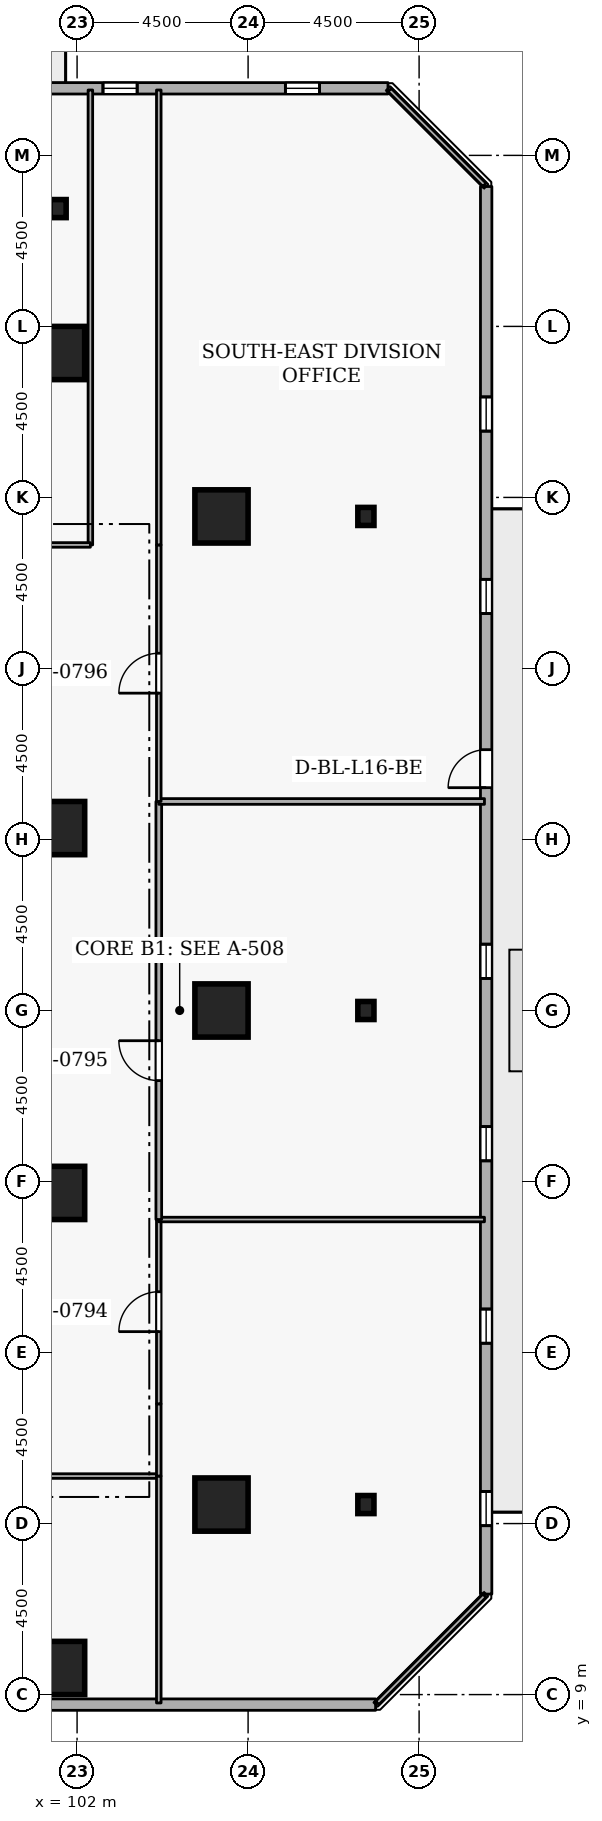
"""IFC4 building model, lengths in metres.
Left out: names, types, materials, properties, quantities, classifications, styles, units other than length and angle.
Written with IfcOpenShell. Run it as: python <this file> out.ifc"""

import sys

from ifc_helpers import new_model, si_unit, direction, frame, frame_2d, origin, origin_2d, place, context, subcontext, project, spatial, rectangle, i_section, extrude, element, fill, save


model = new_model("IFC4")
c1 = context("Model", 3, precision=1e-05, world=origin(), true_north=direction((0.0, 1.0)))
c2 = subcontext(c1, "Body", "Model", "MODEL_VIEW")
j1 = project(units=[si_unit("LENGTHUNIT", "METRE"), si_unit("PLANEANGLEUNIT", "RADIAN")], contexts=[c1])
p1 = place(None, origin())
s1 = spatial("IfcSite", under=j1, at=p1, CompositionType="ELEMENT")
p2 = place(p1, origin())
s2 = spatial("IfcBuilding", under=s1, at=p2, CompositionType="ELEMENT")
p3 = place(p2, frame((0.0, 0.0, 64.5)))
s3 = spatial("IfcBuildingStorey", under=s2, at=p3, CompositionType="ELEMENT", Elevation=64.5)
for number, where, z_axis, x_axis in (
    (1, (105.8, 14.0, 0.0), (0.0, 0.0, 1.0), (1.0, 0.0, 0.0)),
    (2, (105.8, 27.0, 0.0), (0.0, 0.0, 1.0), (1.0, 0.0, 0.0)),
    (3, (105.8, 40.0, 0.0), (0.0, 0.0, 1.0), (1.0, 0.0, 0.0)),
    (4, (101.5, 44.3, 0.0), (0.0, 0.0, 1.0), (1.0, 0.0, 0.0)),
    (5, (101.5, 9.7, 0.0), (0.0, 0.0, 1.0), (1.0, 0.0, 0.0)),
    (6, (101.5, 22.2, 0.0), (0.0, 0.0, 1.0), (1.0, 0.0, 0.0)),
    (7, (101.5, 31.8, 0.0), (0.0, 0.0, 1.0), (1.0, 0.0, 0.0)),
):
    element("IfcColumn", number, at=place(p3, frame(where, z_axis=z_axis, x_axis=x_axis)), inside=s3, PredefinedType="COLUMN", context=c2, shape_type="SweptSolid", body=[
        extrude(rectangle(XDim=1.4, YDim=1.4, at=origin_2d()), origin(), (0.0, 0.0, 1.0), 3.6),
    ])
for number, where, z_axis, x_axis in (
    (8, (109.6, 14.0, 0.0), (0.0, 0.0, 1.0), (1.0, 0.0, 0.0)),
    (9, (109.6, 27.0, 0.0), (0.0, 0.0, 1.0), (1.0, 0.0, 0.0)),
    (10, (109.6, 40.0, 0.0), (0.0, 0.0, 1.0), (1.0, 0.0, 0.0)),
    (11, (101.5, 48.1, 0.0), (0.0, 0.0, 1.0), (1.0, 0.0, 0.0)),
):
    element("IfcColumn", number, at=place(p3, frame(where, z_axis=z_axis, x_axis=x_axis)), inside=s3, PredefinedType="COLUMN", context=c2, shape_type="SweptSolid", body=[
        extrude(i_section(OverallWidth=0.424, OverallDepth=0.475, WebThickness=0.048, FlangeThickness=0.077, FilletRadius=0.015, at=origin_2d()), origin(), (0.0, 0.0, 1.0), 3.6),
    ])
p4 = place(p3, frame((72.819, 8.735, 0.0), z_axis=(0.0, 0.0, 1.0), x_axis=(0.999999999457, 3.2959355e-05, 0.0)))
e12 = element("IfcWall", 12, at=p4, inside=s3, PredefinedType="STANDARD", context=c2, shape_type="SweptSolid", body=[
    extrude(rectangle(XDim=37.037, YDim=0.3, at=frame_2d((18.518, 0.0))), origin(), (0.0, 0.0, 1.0), 2.7),
])
p5 = place(p4, frame((6.6, 0.0, 0.72)))
e13 = element("IfcOpeningElement", 13, at=p5, cuts=e12, PredefinedType="OPENING", context=c2, shape_type="SweptSolid", body=[
    extrude(rectangle(XDim=0.9, YDim=1.75, at=frame_2d((0.45, 0.875))), frame((0.0, 0.16, 0.0), z_axis=(0.0, -1.0, 0.0), x_axis=(1.0, 0.0, 0.0)), (0.0, 0.0, 1.0), 0.32),
])
p6 = place(p4, frame((11.4, 0.0, 0.72)))
e14 = element("IfcOpeningElement", 14, at=p6, cuts=e12, PredefinedType="OPENING", context=c2, shape_type="SweptSolid", body=[
    extrude(rectangle(XDim=0.9, YDim=1.75, at=frame_2d((0.45, 0.875))), frame((0.0, 0.16, 0.0), z_axis=(0.0, -1.0, 0.0), x_axis=(1.0, 0.0, 0.0)), (0.0, 0.0, 1.0), 0.32),
])
p7 = place(p4, frame((21.0, 0.0, 0.72)))
e15 = element("IfcOpeningElement", 15, at=p7, cuts=e12, PredefinedType="OPENING", context=c2, shape_type="SweptSolid", body=[
    extrude(rectangle(XDim=0.9, YDim=1.75, at=frame_2d((0.45, 0.875))), frame((0.0, 0.16, 0.0), z_axis=(0.0, -1.0, 0.0), x_axis=(1.0, 0.0, 0.0)), (0.0, 0.0, 1.0), 0.32),
])
p8 = place(p4, frame((25.8, 0.0, 0.72)))
e16 = element("IfcOpeningElement", 16, at=p8, cuts=e12, PredefinedType="OPENING", context=c2, shape_type="SweptSolid", body=[
    extrude(rectangle(XDim=0.9, YDim=1.75, at=frame_2d((0.45, 0.875))), frame((0.0, 0.16, 0.0), z_axis=(0.0, -1.0, 0.0), x_axis=(1.0, 0.0, 0.0)), (0.0, 0.0, 1.0), 0.32),
])
p9 = place(p3, frame((112.764, 11.645, 0.0), z_axis=(0.0, 0.0, 1.0), x_axis=(3.2959355e-05, 0.999999999457, 0.0)))
e17 = element("IfcWall", 17, at=p9, inside=s3, PredefinedType="STANDARD", context=c2, shape_type="SweptSolid", body=[
    extrude(rectangle(XDim=37.037, YDim=0.3, at=frame_2d((18.518, 0.0))), origin(), (0.0, 0.0, 1.0), 2.7),
])
p10 = place(p9, frame((21.218, 0.0, 0.0)))
e18 = element("IfcOpeningElement", 18, at=p10, cuts=e17, PredefinedType="OPENING", context=c2, shape_type="SweptSolid", body=[
    extrude(rectangle(XDim=1.0, YDim=2.08, at=frame_2d((0.5, 1.04))), frame((0.0, 0.16, 0.0), z_axis=(0.0, -1.0, 0.0), x_axis=(1.0, 0.0, 0.0)), (0.0, 0.0, 1.0), 0.32),
])
p11 = place(p9, frame((1.8, 0.0, 0.72)))
e19 = element("IfcOpeningElement", 19, at=p11, cuts=e17, PredefinedType="OPENING", context=c2, shape_type="SweptSolid", body=[
    extrude(rectangle(XDim=0.9, YDim=1.75, at=frame_2d((0.45, 0.875))), frame((0.0, 0.16, 0.0), z_axis=(0.0, -1.0, 0.0), x_axis=(1.0, 0.0, 0.0)), (0.0, 0.0, 1.0), 0.32),
])
p12 = place(p9, frame((6.6, 0.0, 0.72)))
e20 = element("IfcOpeningElement", 20, at=p12, cuts=e17, PredefinedType="OPENING", context=c2, shape_type="SweptSolid", body=[
    extrude(rectangle(XDim=0.9, YDim=1.75, at=frame_2d((0.45, 0.875))), frame((0.0, 0.16, 0.0), z_axis=(0.0, -1.0, 0.0), x_axis=(1.0, 0.0, 0.0)), (0.0, 0.0, 1.0), 0.32),
])
p13 = place(p9, frame((11.4, 0.0, 0.72)))
e21 = element("IfcOpeningElement", 21, at=p13, cuts=e17, PredefinedType="OPENING", context=c2, shape_type="SweptSolid", body=[
    extrude(rectangle(XDim=0.9, YDim=1.75, at=frame_2d((0.45, 0.875))), frame((0.0, 0.16, 0.0), z_axis=(0.0, -1.0, 0.0), x_axis=(1.0, 0.0, 0.0)), (0.0, 0.0, 1.0), 0.32),
])
p14 = place(p9, frame((16.2, 0.0, 0.72)))
e22 = element("IfcOpeningElement", 22, at=p14, cuts=e17, PredefinedType="OPENING", context=c2, shape_type="SweptSolid", body=[
    extrude(rectangle(XDim=0.9, YDim=1.75, at=frame_2d((0.45, 0.875))), frame((0.0, 0.16, 0.0), z_axis=(0.0, -1.0, 0.0), x_axis=(1.0, 0.0, 0.0)), (0.0, 0.0, 1.0), 0.32),
])
p15 = place(p9, frame((25.8, 0.0, 0.72)))
e23 = element("IfcOpeningElement", 23, at=p15, cuts=e17, PredefinedType="OPENING", context=c2, shape_type="SweptSolid", body=[
    extrude(rectangle(XDim=0.9, YDim=1.75, at=frame_2d((0.45, 0.875))), frame((0.0, 0.16, 0.0), z_axis=(0.0, -1.0, 0.0), x_axis=(1.0, 0.0, 0.0)), (0.0, 0.0, 1.0), 0.32),
])
p16 = place(p9, frame((30.6, 0.0, 0.72)))
e24 = element("IfcOpeningElement", 24, at=p16, cuts=e17, PredefinedType="OPENING", context=c2, shape_type="SweptSolid", body=[
    extrude(rectangle(XDim=0.9, YDim=1.75, at=frame_2d((0.45, 0.875))), frame((0.0, 0.16, 0.0), z_axis=(0.0, -1.0, 0.0), x_axis=(1.0, 0.0, 0.0)), (0.0, 0.0, 1.0), 0.32),
])
p17 = place(p3, frame((110.181, 51.265, 0.0), z_axis=(0.0, 0.0, 1.0), x_axis=(-0.999999999457, -3.2959355e-05, 0.0)))
e25 = element("IfcWall", 25, at=p17, inside=s3, PredefinedType="STANDARD", context=c2, shape_type="SweptSolid", body=[
    extrude(rectangle(XDim=37.037, YDim=0.3, at=frame_2d((18.518, 0.0))), origin(), (0.0, 0.0, 1.0), 2.7),
])
p18 = place(p17, frame((20.318, 0.0, 0.0)))
e26 = element("IfcOpeningElement", 26, at=p18, cuts=e25, PredefinedType="OPENING", context=c2, shape_type="SweptSolid", body=[
    extrude(rectangle(XDim=1.0, YDim=2.08, at=frame_2d((0.5, 1.04))), frame((0.0, 0.16, 0.0), z_axis=(0.0, -1.0, 0.0), x_axis=(1.0, 0.0, 0.0)), (0.0, 0.0, 1.0), 0.32),
])
p19 = place(p17, frame((1.8, 0.0, 0.72)))
e27 = element("IfcOpeningElement", 27, at=p19, cuts=e25, PredefinedType="OPENING", context=c2, shape_type="SweptSolid", body=[
    extrude(rectangle(XDim=0.9, YDim=1.75, at=frame_2d((0.45, 0.875))), frame((0.0, 0.16, 0.0), z_axis=(0.0, -1.0, 0.0), x_axis=(1.0, 0.0, 0.0)), (0.0, 0.0, 1.0), 0.32),
])
p20 = place(p17, frame((6.6, 0.0, 0.72)))
e28 = element("IfcOpeningElement", 28, at=p20, cuts=e25, PredefinedType="OPENING", context=c2, shape_type="SweptSolid", body=[
    extrude(rectangle(XDim=0.9, YDim=1.75, at=frame_2d((0.45, 0.875))), frame((0.0, 0.16, 0.0), z_axis=(0.0, -1.0, 0.0), x_axis=(1.0, 0.0, 0.0)), (0.0, 0.0, 1.0), 0.32),
])
p21 = place(p17, frame((11.4, 0.0, 0.72)))
e29 = element("IfcOpeningElement", 29, at=p21, cuts=e25, PredefinedType="OPENING", context=c2, shape_type="SweptSolid", body=[
    extrude(rectangle(XDim=0.9, YDim=1.75, at=frame_2d((0.45, 0.875))), frame((0.0, 0.16, 0.0), z_axis=(0.0, -1.0, 0.0), x_axis=(1.0, 0.0, 0.0)), (0.0, 0.0, 1.0), 0.32),
])
p22 = place(p17, frame((16.2, 0.0, 0.72)))
e30 = element("IfcOpeningElement", 30, at=p22, cuts=e25, PredefinedType="OPENING", context=c2, shape_type="SweptSolid", body=[
    extrude(rectangle(XDim=0.9, YDim=1.75, at=frame_2d((0.45, 0.875))), frame((0.0, 0.16, 0.0), z_axis=(0.0, -1.0, 0.0), x_axis=(1.0, 0.0, 0.0)), (0.0, 0.0, 1.0), 0.32),
])
p23 = place(p17, frame((25.8, 0.0, 0.72)))
e31 = element("IfcOpeningElement", 31, at=p23, cuts=e25, PredefinedType="OPENING", context=c2, shape_type="SweptSolid", body=[
    extrude(rectangle(XDim=0.9, YDim=1.75, at=frame_2d((0.45, 0.875))), frame((0.0, 0.16, 0.0), z_axis=(0.0, -1.0, 0.0), x_axis=(1.0, 0.0, 0.0)), (0.0, 0.0, 1.0), 0.32),
])
p24 = place(p17, frame((30.6, 0.0, 0.72)))
e32 = element("IfcOpeningElement", 32, at=p24, cuts=e25, PredefinedType="OPENING", context=c2, shape_type="SweptSolid", body=[
    extrude(rectangle(XDim=0.9, YDim=1.75, at=frame_2d((0.45, 0.875))), frame((0.0, 0.16, 0.0), z_axis=(0.0, -1.0, 0.0), x_axis=(1.0, 0.0, 0.0)), (0.0, 0.0, 1.0), 0.32),
])
p25 = place(p3, frame((94.8, 14.75, 0.0), z_axis=(0.0, 0.0, 1.0), x_axis=(1.0, 0.0, 0.0)))
e33 = element("IfcWall", 33, at=p25, inside=s3, PredefinedType="PARTITIONING", context=c2, shape_type="SweptSolid", body=[
    extrude(rectangle(XDim=9.35, YDim=0.12, at=frame_2d((4.675, 0.0))), origin(), (0.0, 0.0, 1.0), 3.34),
])
p26 = place(p25, frame((4.15, 0.0, 0.0)))
e34 = element("IfcOpeningElement", 34, at=p26, cuts=e33, PredefinedType="OPENING", context=c2, shape_type="SweptSolid", body=[
    extrude(rectangle(XDim=1.05, YDim=2.1, at=frame_2d((0.525, 1.05))), frame((0.0, 0.07, 0.0), z_axis=(0.0, -1.0, 0.0), x_axis=(1.0, 0.0, 0.0)), (0.0, 0.0, 1.0), 0.14),
])
p27 = place(p3, frame((104.15, 14.75, 0.0), z_axis=(0.0, 0.0, 1.0), x_axis=(0.0, -1.0, 0.0)))
e35 = element("IfcWall", 35, at=p27, inside=s3, PredefinedType="PARTITIONING", context=c2, shape_type="SweptSolid", body=[
    extrude(rectangle(XDim=5.97, YDim=0.12, at=frame_2d((2.985, 0.0))), origin(), (0.0, 0.0, 1.0), 3.34),
])
p28 = place(p3, frame((102.35, 51.22, 0.0), z_axis=(0.0, 0.0, 1.0), x_axis=(0.0, -1.0, 0.0)))
e36 = element("IfcWall", 36, at=p28, inside=s3, PredefinedType="PARTITIONING", context=c2, shape_type="SweptSolid", body=[
    extrude(rectangle(XDim=11.97, YDim=0.12, at=frame_2d((5.985, 0.0))), origin(), (0.0, 0.0, 1.0), 3.34),
])
p29 = place(p3, frame((102.35, 39.25, 0.0), z_axis=(0.0, 0.0, 1.0), x_axis=(-1.0, 0.0, 0.0)))
e37 = element("IfcWall", 37, at=p29, inside=s3, PredefinedType="PARTITIONING", context=c2, shape_type="SweptSolid", body=[
    extrude(rectangle(XDim=1.862, YDim=0.12, at=frame_2d((0.931, 0.0))), origin(), (0.0, 0.0, 1.0), 3.34),
])
p30 = place(p3, frame((104.15, 14.75, 0.0), z_axis=(0.0, 0.0, 1.0), x_axis=(0.0, 1.0, 0.0)))
e38 = element("IfcWall", 38, at=p30, inside=s3, PredefinedType="PARTITIONING", context=c2, shape_type="SweptSolid", body=[
    extrude(rectangle(XDim=1.9, YDim=0.12, at=frame_2d((0.95, 0.0))), origin(), (0.0, 0.0, 1.0), 3.34),
])
p31 = place(p3, frame((104.15, 16.65, 0.0), z_axis=(0.0, 0.0, 1.0), x_axis=(0.0, 1.0, 0.0)))
e39 = element("IfcWall", 39, at=p31, inside=s3, PredefinedType="PARTITIONING", context=c2, shape_type="SweptSolid", body=[
    extrude(rectangle(XDim=4.85, YDim=0.12, at=frame_2d((2.425, 0.0))), origin(), (0.0, 0.0, 1.0), 3.34),
])
p32 = place(p31, frame((1.9, 0.0, 0.0)))
e40 = element("IfcOpeningElement", 40, at=p32, cuts=e39, PredefinedType="OPENING", context=c2, shape_type="SweptSolid", body=[
    extrude(rectangle(XDim=1.05, YDim=2.1, at=frame_2d((0.525, 1.05))), frame((0.0, 0.07, 0.0), z_axis=(0.0, -1.0, 0.0), x_axis=(1.0, 0.0, 0.0)), (0.0, 0.0, 1.0), 0.14),
])
p33 = place(p3, frame((104.15, 21.5, 0.0), z_axis=(0.0, 0.0, 1.0), x_axis=(1.0, 0.0, 0.0)))
e41 = element("IfcWall", 41, at=p33, inside=s3, PredefinedType="PARTITIONING", context=c2, shape_type="SweptSolid", body=[
    extrude(rectangle(XDim=8.57, YDim=0.12, at=frame_2d((4.285, 0.0))), origin(), (0.0, 0.0, 1.0), 3.34),
])
p34 = place(p3, frame((112.72, 11.602, 0.0), z_axis=(0.0, 0.0, 1.0), x_axis=(-0.707106781187, -0.707106781187, 0.0)))
e42 = element("IfcWall", 42, at=p34, inside=s3, PredefinedType="PARTITIONING", context=c2, shape_type="SweptSolid", body=[
    extrude(rectangle(XDim=3.99, YDim=0.12, at=frame_2d((1.995, 0.0))), origin(), (0.0, 0.0, 1.0), 3.34),
])
p35 = place(p3, frame((104.15, 21.5, 0.0), z_axis=(0.0, 0.0, 1.0), x_axis=(0.0, 1.0, 0.0)))
e43 = element("IfcWall", 43, at=p35, inside=s3, PredefinedType="PARTITIONING", context=c2, shape_type="SweptSolid", body=[
    extrude(rectangle(XDim=11.0, YDim=0.15, at=frame_2d((5.5, 0.0))), origin(), (0.0, 0.0, 1.0), 3.34),
])
p36 = place(p35, frame((3.655, 0.0, 0.0)))
e44 = element("IfcOpeningElement", 44, at=p36, cuts=e43, PredefinedType="OPENING", context=c2, shape_type="SweptSolid", body=[
    extrude(rectangle(XDim=1.05, YDim=2.1, at=frame_2d((0.525, 1.05))), frame((0.0, 0.085, 0.0), z_axis=(0.0, -1.0, 0.0), x_axis=(1.0, 0.0, 0.0)), (0.0, 0.0, 1.0), 0.17),
])
p37 = place(p3, frame((104.15, 32.5, 0.0), z_axis=(0.0, 0.0, 1.0), x_axis=(1.0, 0.0, 0.0)))
e45 = element("IfcWall", 45, at=p37, inside=s3, PredefinedType="PARTITIONING", context=c2, shape_type="SweptSolid", body=[
    extrude(rectangle(XDim=8.57, YDim=0.15, at=frame_2d((4.285, 0.0))), origin(), (0.0, 0.0, 1.0), 3.34),
])
p38 = place(p3, frame((104.15, 32.5, 0.0), z_axis=(0.0, 0.0, 1.0), x_axis=(0.0, 1.0, 0.0)))
e46 = element("IfcWall", 46, at=p38, inside=s3, PredefinedType="PARTITIONING", context=c2, shape_type="SweptSolid", body=[
    extrude(rectangle(XDim=6.75, YDim=0.12, at=frame_2d((3.375, 0.0))), origin(), (0.0, 0.0, 1.0), 3.34),
])
p39 = place(p38, frame((2.85, 0.0, 0.0)))
e47 = element("IfcOpeningElement", 47, at=p39, cuts=e46, PredefinedType="OPENING", context=c2, shape_type="SweptSolid", body=[
    extrude(rectangle(XDim=1.05, YDim=2.1, at=frame_2d((0.525, 1.05))), frame((0.0, 0.07, 0.0), z_axis=(0.0, -1.0, 0.0), x_axis=(1.0, 0.0, 0.0)), (0.0, 0.0, 1.0), 0.14),
])
p40 = place(p3, frame((104.15, 39.25, 0.0), z_axis=(0.0, 0.0, 1.0), x_axis=(0.0, 1.0, 0.0)))
e48 = element("IfcWall", 48, at=p40, inside=s3, PredefinedType="PARTITIONING", context=c2, shape_type="SweptSolid", body=[
    extrude(rectangle(XDim=11.97, YDim=0.12, at=frame_2d((5.985, 0.0))), origin(), (0.0, 0.0, 1.0), 3.34),
])
p41 = place(p3, frame((110.225, 51.22, 0.0), z_axis=(0.0, 0.0, 1.0), x_axis=(0.707106781187, -0.707106781187, 0.0)))
e49 = element("IfcWall", 49, at=p41, inside=s3, PredefinedType="PARTITIONING", context=c2, shape_type="SweptSolid", body=[
    extrude(rectangle(XDim=3.528, YDim=0.12, at=frame_2d((1.764, 0.0))), origin(), (0.0, 0.0, 1.0), 3.34),
])
p42 = place(p10, origin())
e50 = element("IfcDoor", 50, at=p42, inside=s3, OperationType="SINGLE_SWING_LEFT", PredefinedType="DOOR", context=c2, shape_type="SweptSolid", body=[
    extrude(rectangle(XDim=1.0, YDim=2.08, at=frame_2d((0.5, 1.04))), frame((0.0, 0.025, 0.0), z_axis=(0.0, -1.0, 0.0), x_axis=(1.0, 0.0, 0.0)), (0.0, 0.0, 1.0), 0.05),
])
fill(e18, e50)
p43 = place(p11, origin())
e51 = element("IfcWindow", 51, at=p43, inside=s3, PartitioningType="SINGLE_PANEL", PredefinedType="WINDOW", context=c2, shape_type="SweptSolid", body=[
    extrude(rectangle(XDim=0.9, YDim=1.75, at=frame_2d((0.45, 0.875))), frame((0.0, 0.03, 0.0), z_axis=(0.0, -1.0, 0.0), x_axis=(1.0, 0.0, 0.0)), (0.0, 0.0, 1.0), 0.06),
])
fill(e19, e51)
p44 = place(p12, origin())
e52 = element("IfcWindow", 52, at=p44, inside=s3, PartitioningType="SINGLE_PANEL", PredefinedType="WINDOW", context=c2, shape_type="SweptSolid", body=[
    extrude(rectangle(XDim=0.9, YDim=1.75, at=frame_2d((0.45, 0.875))), frame((0.0, 0.03, 0.0), z_axis=(0.0, -1.0, 0.0), x_axis=(1.0, 0.0, 0.0)), (0.0, 0.0, 1.0), 0.06),
])
fill(e20, e52)
p45 = place(p13, origin())
e53 = element("IfcWindow", 53, at=p45, inside=s3, PartitioningType="SINGLE_PANEL", PredefinedType="WINDOW", context=c2, shape_type="SweptSolid", body=[
    extrude(rectangle(XDim=0.9, YDim=1.75, at=frame_2d((0.45, 0.875))), frame((0.0, 0.03, 0.0), z_axis=(0.0, -1.0, 0.0), x_axis=(1.0, 0.0, 0.0)), (0.0, 0.0, 1.0), 0.06),
])
fill(e21, e53)
p46 = place(p14, origin())
e54 = element("IfcWindow", 54, at=p46, inside=s3, PartitioningType="SINGLE_PANEL", PredefinedType="WINDOW", context=c2, shape_type="SweptSolid", body=[
    extrude(rectangle(XDim=0.9, YDim=1.75, at=frame_2d((0.45, 0.875))), frame((0.0, 0.03, 0.0), z_axis=(0.0, -1.0, 0.0), x_axis=(1.0, 0.0, 0.0)), (0.0, 0.0, 1.0), 0.06),
])
fill(e22, e54)
p47 = place(p15, origin())
e55 = element("IfcWindow", 55, at=p47, inside=s3, PartitioningType="SINGLE_PANEL", PredefinedType="WINDOW", context=c2, shape_type="SweptSolid", body=[
    extrude(rectangle(XDim=0.9, YDim=1.75, at=frame_2d((0.45, 0.875))), frame((0.0, 0.03, 0.0), z_axis=(0.0, -1.0, 0.0), x_axis=(1.0, 0.0, 0.0)), (0.0, 0.0, 1.0), 0.06),
])
fill(e23, e55)
p48 = place(p16, origin())
e56 = element("IfcWindow", 56, at=p48, inside=s3, PartitioningType="SINGLE_PANEL", PredefinedType="WINDOW", context=c2, shape_type="SweptSolid", body=[
    extrude(rectangle(XDim=0.9, YDim=1.75, at=frame_2d((0.45, 0.875))), frame((0.0, 0.03, 0.0), z_axis=(0.0, -1.0, 0.0), x_axis=(1.0, 0.0, 0.0)), (0.0, 0.0, 1.0), 0.06),
])
fill(e24, e56)
p49 = place(p19, origin())
e57 = element("IfcWindow", 57, at=p49, inside=s3, PartitioningType="SINGLE_PANEL", PredefinedType="WINDOW", context=c2, shape_type="SweptSolid", body=[
    extrude(rectangle(XDim=0.9, YDim=1.75, at=frame_2d((0.45, 0.875))), frame((0.0, 0.03, 0.0), z_axis=(0.0, -1.0, 0.0), x_axis=(1.0, 0.0, 0.0)), (0.0, 0.0, 1.0), 0.06),
])
fill(e27, e57)
p50 = place(p20, origin())
e58 = element("IfcWindow", 58, at=p50, inside=s3, PartitioningType="SINGLE_PANEL", PredefinedType="WINDOW", context=c2, shape_type="SweptSolid", body=[
    extrude(rectangle(XDim=0.9, YDim=1.75, at=frame_2d((0.45, 0.875))), frame((0.0, 0.03, 0.0), z_axis=(0.0, -1.0, 0.0), x_axis=(1.0, 0.0, 0.0)), (0.0, 0.0, 1.0), 0.06),
])
fill(e28, e58)
p51 = place(p32, origin())
e59 = element("IfcDoor", 59, at=p51, inside=s3, OperationType="SINGLE_SWING_LEFT", PredefinedType="DOOR", context=c2, shape_type="SweptSolid", body=[
    extrude(rectangle(XDim=1.05, YDim=2.1, at=frame_2d((0.525, 1.05))), frame((0.0, 0.025, 0.0), z_axis=(0.0, -1.0, 0.0), x_axis=(1.0, 0.0, 0.0)), (0.0, 0.0, 1.0), 0.05),
])
fill(e40, e59)
p52 = place(p36, origin())
e60 = element("IfcDoor", 60, at=p52, inside=s3, OperationType="SINGLE_SWING_RIGHT", PredefinedType="DOOR", context=c2, shape_type="SweptSolid", body=[
    extrude(rectangle(XDim=1.05, YDim=2.1, at=frame_2d((0.525, 1.05))), frame((0.0, 0.025, 0.0), z_axis=(0.0, -1.0, 0.0), x_axis=(1.0, 0.0, 0.0)), (0.0, 0.0, 1.0), 0.05),
])
fill(e44, e60)
p53 = place(p39, origin())
e61 = element("IfcDoor", 61, at=p53, inside=s3, OperationType="SINGLE_SWING_LEFT", PredefinedType="DOOR", context=c2, shape_type="SweptSolid", body=[
    extrude(rectangle(XDim=1.05, YDim=2.1, at=frame_2d((0.525, 1.05))), frame((0.0, 0.025, 0.0), z_axis=(0.0, -1.0, 0.0), x_axis=(1.0, 0.0, 0.0)), (0.0, 0.0, 1.0), 0.05),
])
fill(e47, e61)
save(model, sys.argv[1])
